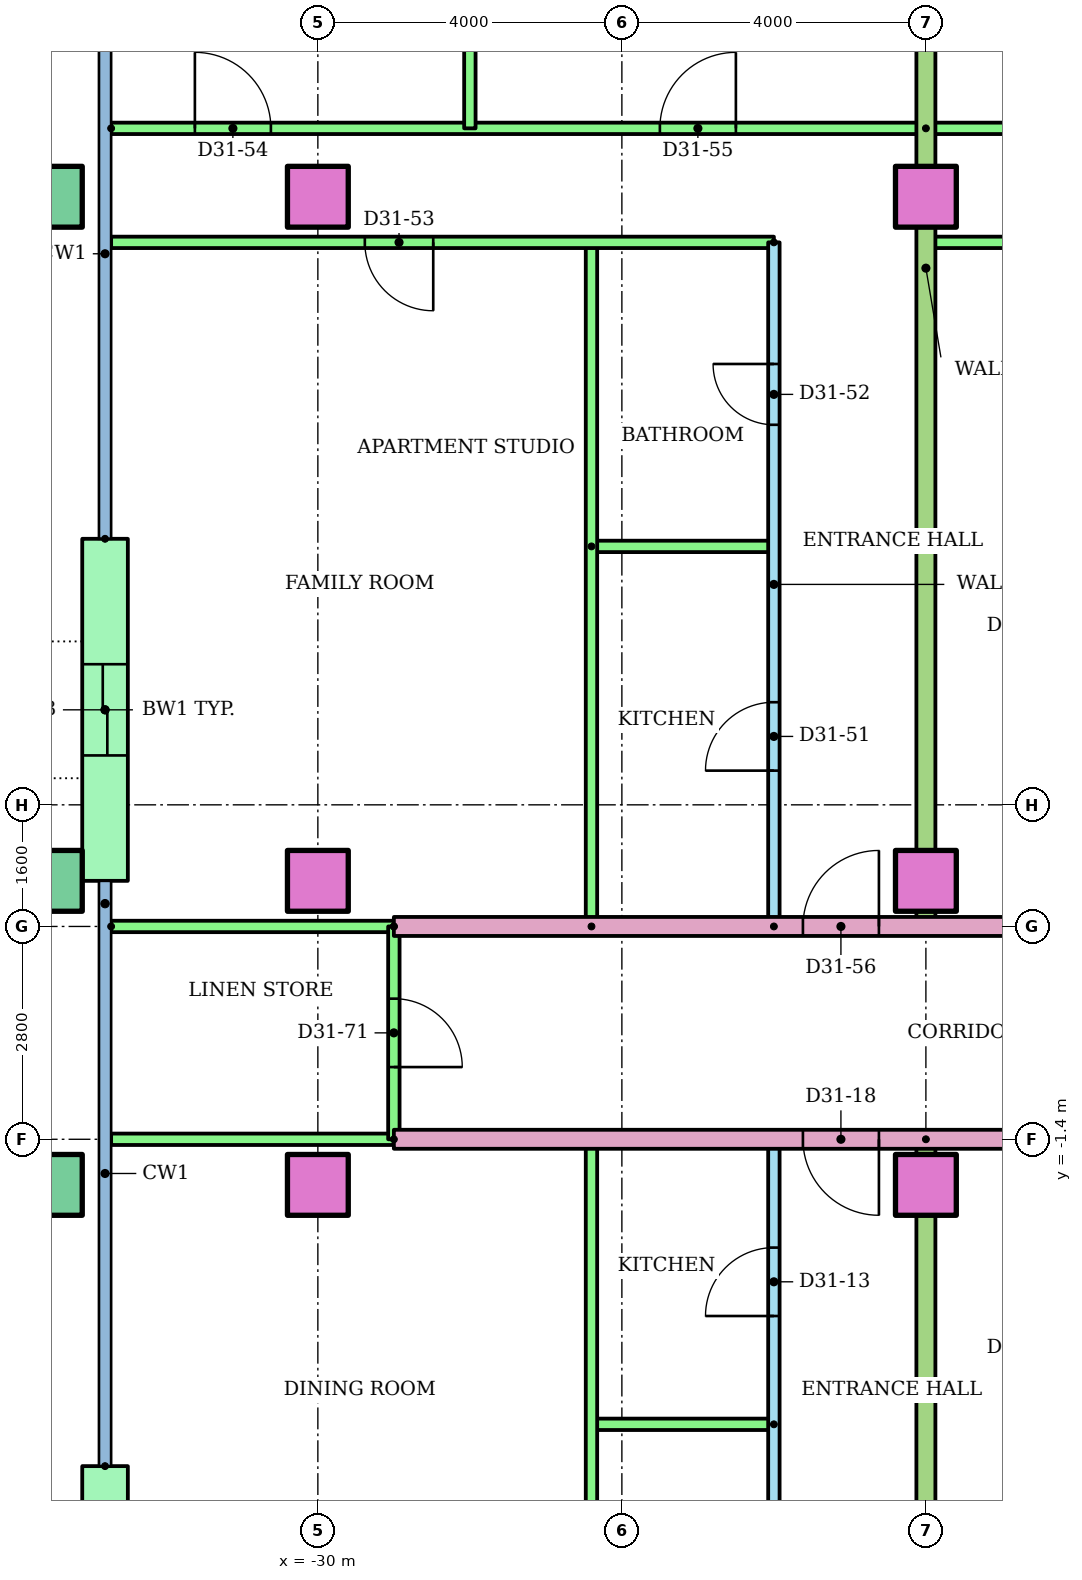
"""IFC4 building model, lengths in metres.
Left out: names, types, materials, properties, quantities, classifications, styles, units other than length and angle.
Written with IfcOpenShell. Run it as: python <this file> out.ifc"""

import sys

from ifc_helpers import new_model, si_unit, direction, frame, frame_2d, origin, origin_2d, place, context, subcontext, project, spatial, rectangle, hollow_rectangle, extrude, element, fill, save


model = new_model("IFC4")
c1 = context("Model", 3, precision=1e-05, world=origin(), true_north=direction((0.0, 1.0)))
c2 = subcontext(c1, "Body", "Model", "MODEL_VIEW")
j1 = project(units=[si_unit("LENGTHUNIT", "METRE"), si_unit("PLANEANGLEUNIT", "RADIAN")], contexts=[c1])
p1 = place(None, origin())
s1 = spatial("IfcSite", under=j1, at=p1, CompositionType="ELEMENT")
p2 = place(p1, origin())
s2 = spatial("IfcBuilding", under=s1, at=p2, CompositionType="ELEMENT")
p3 = place(p2, frame((0.0, 0.0, 123.0)))
s3 = spatial("IfcBuildingStorey", under=s2, at=p3, CompositionType="ELEMENT", Elevation=123.0)
p4 = place(p3, frame((-33.5, -2.0, 0.0)))
e1 = element("IfcColumn", 1, at=p4, inside=s3, PredefinedType="COLUMN", context=c2, shape_type="SweptSolid", body=[
    extrude(hollow_rectangle(XDim=0.8, YDim=0.8, WallThickness=0.04, at=origin_2d()), origin(), (0.0, 0.0, 1.0), 3.2),
])
for number, where in (
    (2, (-30.0, -2.0, 0.0)),
    (3, (-22.0, -2.0, 0.0)),
):
    element("IfcColumn", number, at=place(p3, frame(where)), inside=s3, PredefinedType="COLUMN", context=c2, shape_type="SweptSolid", body=[
        extrude(rectangle(XDim=0.8, YDim=0.8, at=origin_2d()), origin(), (0.0, 0.0, 1.0), 3.2),
    ])
p5 = place(p3, frame((-33.5, 2.0, 0.0)))
e4 = element("IfcColumn", 4, at=p5, inside=s3, PredefinedType="COLUMN", context=c2, shape_type="SweptSolid", body=[
    extrude(hollow_rectangle(XDim=0.8, YDim=0.8, WallThickness=0.04, at=origin_2d()), origin(), (0.0, 0.0, 1.0), 3.2),
])
for number, where in (
    (5, (-30.0, 2.0, 0.0)),
    (6, (-22.0, 2.0, 0.0)),
):
    element("IfcColumn", number, at=place(p3, frame(where)), inside=s3, PredefinedType="COLUMN", context=c2, shape_type="SweptSolid", body=[
        extrude(rectangle(XDim=0.8, YDim=0.8, at=origin_2d()), origin(), (0.0, 0.0, 1.0), 3.2),
    ])
p6 = place(p3, frame((-33.5, 11.0, 0.0)))
e7 = element("IfcColumn", 7, at=p6, inside=s3, PredefinedType="COLUMN", context=c2, shape_type="SweptSolid", body=[
    extrude(hollow_rectangle(XDim=0.8, YDim=0.8, WallThickness=0.04, at=origin_2d()), origin(), (0.0, 0.0, 1.0), 3.2),
])
for number, where in (
    (8, (-30.0, 11.0, 0.0)),
    (9, (-22.0, 11.0, 0.0)),
):
    element("IfcColumn", number, at=place(p3, frame(where)), inside=s3, PredefinedType="COLUMN", context=c2, shape_type="SweptSolid", body=[
        extrude(rectangle(XDim=0.8, YDim=0.8, at=origin_2d()), origin(), (0.0, 0.0, 1.0), 3.2),
    ])
p7 = place(p3, frame((-32.8, 6.5, 0.0), z_axis=(0.0, 0.0, 1.0), x_axis=(0.0, -1.0, 0.0)))
e10 = element("IfcWall", 10, at=p7, inside=s3, PredefinedType="STANDARD", context=c2, shape_type="SweptSolid", body=[
    extrude(rectangle(XDim=4.5, YDim=0.6, at=frame_2d((2.25, 0.0))), origin(), (0.0, 0.0, 1.0), 2.92),
])
p8 = place(p7, frame((1.65, 0.0, 0.0)))
e11 = element("IfcOpeningElement", 11, at=p8, cuts=e10, PredefinedType="OPENING", context=c2, shape_type="SweptSolid", body=[
    extrude(rectangle(XDim=1.2, YDim=2.1, at=frame_2d((0.6, 1.05))), frame((0.0, 0.31, 0.0), z_axis=(0.0, -1.0, 0.0), x_axis=(1.0, 0.0, 0.0)), (0.0, 0.0, 1.0), 0.62),
])
p9 = place(p3, frame((-32.8, -5.7, 0.0), z_axis=(0.0, 0.0, 1.0), x_axis=(0.0, -1.0, 0.0)))
e12 = element("IfcWall", 12, at=p9, inside=s3, PredefinedType="STANDARD", context=c2, shape_type="SweptSolid", body=[
    extrude(rectangle(XDim=3.7, YDim=0.6, at=frame_2d((1.85, 0.0))), origin(), (0.0, 0.0, 1.0), 2.92),
])
p10 = place(p9, frame((0.925, 0.0, 0.0)))
e13 = element("IfcOpeningElement", 13, at=p10, cuts=e12, PredefinedType="OPENING", context=c2, shape_type="SweptSolid", body=[
    extrude(rectangle(XDim=1.2, YDim=2.1, at=frame_2d((0.6, 1.05))), frame((0.0, 0.31, 0.0), z_axis=(0.0, -1.0, 0.0), x_axis=(1.0, 0.0, 0.0)), (0.0, 0.0, 1.0), 0.62),
])
p11 = place(p3, frame((-24.0, -8.0, 0.0), z_axis=(0.0, 0.0, 1.0), x_axis=(0.0, 1.0, 0.0)))
e14 = element("IfcWall", 14, at=p11, inside=s3, PredefinedType="PARTITIONING", context=c2, shape_type="SweptSolid", body=[
    extrude(rectangle(XDim=6.6, YDim=0.15, at=frame_2d((3.3, 0.0))), origin(), (0.0, 0.0, 1.0), 2.4),
])
p12 = place(p11, frame((4.275, 0.0, 0.0)))
e15 = element("IfcOpeningElement", 15, at=p12, cuts=e14, PredefinedType="OPENING", context=c2, shape_type="SweptSolid", body=[
    extrude(rectangle(XDim=0.9, YDim=2.1, at=frame_2d((0.45, 1.05))), frame((0.0, 0.085, 0.0), z_axis=(0.0, -1.0, 0.0), x_axis=(1.0, 0.0, 0.0)), (0.0, 0.0, 1.0), 0.17),
])
p13 = place(p11, frame((1.025, 0.0, 0.0)))
e16 = element("IfcOpeningElement", 16, at=p13, cuts=e14, PredefinedType="OPENING", context=c2, shape_type="SweptSolid", body=[
    extrude(rectangle(XDim=0.8, YDim=2.1, at=frame_2d((0.4, 1.05))), frame((0.0, 0.085, 0.0), z_axis=(0.0, -1.0, 0.0), x_axis=(1.0, 0.0, 0.0)), (0.0, 0.0, 1.0), 0.17),
])
p14 = place(p3, frame((-24.0, -5.15, 0.0), z_axis=(0.0, 0.0, 1.0), x_axis=(-1.0, 0.0, 0.0)))
e17 = element("IfcWall", 17, at=p14, inside=s3, PredefinedType="PARTITIONING", context=c2, shape_type="SweptSolid", body=[
    extrude(rectangle(XDim=2.4, YDim=0.15, at=frame_2d((1.2, 0.0))), origin(), (0.0, 0.0, 1.0), 2.4),
])
p15 = place(p3, frame((-26.4, -8.0, 0.0), z_axis=(0.0, 0.0, 1.0), x_axis=(0.0, 1.0, 0.0)))
e18 = element("IfcWall", 18, at=p15, inside=s3, PredefinedType="PARTITIONING", context=c2, shape_type="SweptSolid", body=[
    extrude(rectangle(XDim=6.6, YDim=0.15, at=frame_2d((3.3, 0.0))), origin(), (0.0, 0.0, 1.0), 2.4),
])
p16 = place(p3, frame((-22.0, -1.4, 0.0), z_axis=(0.0, 0.0, 1.0), x_axis=(0.0, -1.0, 0.0)))
e19 = element("IfcWall", 19, at=p16, inside=s3, PredefinedType="PARTITIONING", context=c2, shape_type="SweptSolid", body=[
    extrude(rectangle(XDim=14.91, YDim=0.25, at=frame_2d((7.455, 0.0))), origin(), (0.0, 0.0, 1.0), 2.4),
])
p17 = place(p3, frame((-14.0, -1.4, 0.0), z_axis=(0.0, 0.0, 1.0), x_axis=(-1.0, 0.0, 0.0)))
e20 = element("IfcWall", 20, at=p17, inside=s3, PredefinedType="PARTITIONING", context=c2, shape_type="SweptSolid", body=[
    extrude(rectangle(XDim=15.0, YDim=0.25, at=frame_2d((7.5, 0.0))), origin(), (0.0, 0.0, 1.0), 2.4),
])
p18 = place(p17, frame((8.618, 0.0, 0.0)))
e21 = element("IfcOpeningElement", 21, at=p18, cuts=e20, PredefinedType="OPENING", context=c2, shape_type="SweptSolid", body=[
    extrude(rectangle(XDim=1.0, YDim=2.1, at=frame_2d((0.5, 1.05))), frame((0.0, 0.135, 0.0), z_axis=(0.0, -1.0, 0.0), x_axis=(1.0, 0.0, 0.0)), (0.0, 0.0, 1.0), 0.27),
])
p19 = place(p17, frame((0.618, 0.0, 0.0)))
e22 = element("IfcOpeningElement", 22, at=p19, cuts=e20, PredefinedType="OPENING", context=c2, shape_type="SweptSolid", body=[
    extrude(rectangle(XDim=1.0, YDim=2.1, at=frame_2d((0.5, 1.05))), frame((0.0, 0.135, 0.0), z_axis=(0.0, -1.0, 0.0), x_axis=(1.0, 0.0, 0.0)), (0.0, 0.0, 1.0), 0.27),
])
p20 = place(p3, frame((-29.0, -1.4, 0.0), z_axis=(0.0, 0.0, 1.0), x_axis=(-1.0, 0.0, 0.0)))
e23 = element("IfcWall", 23, at=p20, inside=s3, PredefinedType="PARTITIONING", context=c2, shape_type="SweptSolid", body=[
    extrude(rectangle(XDim=3.72, YDim=0.15, at=frame_2d((1.86, 0.0))), origin(), (0.0, 0.0, 1.0), 2.4),
])
p21 = place(p3, frame((-24.0, 1.4, 0.0), z_axis=(0.0, 0.0, 1.0), x_axis=(0.0, 1.0, 0.0)))
e24 = element("IfcWall", 24, at=p21, inside=s3, PredefinedType="PARTITIONING", context=c2, shape_type="SweptSolid", body=[
    extrude(rectangle(XDim=9.0, YDim=0.15, at=frame_2d((4.5, 0.0))), origin(), (0.0, 0.0, 1.0), 2.4),
])
p22 = place(p21, frame((2.05, 0.0, 0.0)))
e25 = element("IfcOpeningElement", 25, at=p22, cuts=e24, PredefinedType="OPENING", context=c2, shape_type="SweptSolid", body=[
    extrude(rectangle(XDim=0.9, YDim=2.1, at=frame_2d((0.45, 1.05))), frame((0.0, 0.085, 0.0), z_axis=(0.0, -1.0, 0.0), x_axis=(1.0, 0.0, 0.0)), (0.0, 0.0, 1.0), 0.17),
])
p23 = place(p21, frame((6.6, 0.0, 0.0)))
e26 = element("IfcOpeningElement", 26, at=p23, cuts=e24, PredefinedType="OPENING", context=c2, shape_type="SweptSolid", body=[
    extrude(rectangle(XDim=0.8, YDim=2.1, at=frame_2d((0.4, 1.05))), frame((0.0, 0.085, 0.0), z_axis=(0.0, -1.0, 0.0), x_axis=(1.0, 0.0, 0.0)), (0.0, 0.0, 1.0), 0.17),
])
p24 = place(p3, frame((-26.4, 6.4, 0.0)))
e27 = element("IfcWall", 27, at=p24, inside=s3, PredefinedType="PARTITIONING", context=c2, shape_type="SweptSolid", body=[
    extrude(rectangle(XDim=2.4, YDim=0.15, at=frame_2d((1.2, 0.0))), origin(), (0.0, 0.0, 1.0), 2.4),
])
p25 = place(p3, frame((-26.4, 1.4, 0.0), z_axis=(0.0, 0.0, 1.0), x_axis=(0.0, 1.0, 0.0)))
e28 = element("IfcWall", 28, at=p25, inside=s3, PredefinedType="PARTITIONING", context=c2, shape_type="SweptSolid", body=[
    extrude(rectangle(XDim=9.0, YDim=0.15, at=frame_2d((4.5, 0.0))), origin(), (0.0, 0.0, 1.0), 2.4),
])
p26 = place(p3, frame((-24.0, 10.4, 0.0), z_axis=(0.0, 0.0, 1.0), x_axis=(-1.0, 0.0, 0.0)))
e29 = element("IfcWall", 29, at=p26, inside=s3, PredefinedType="PARTITIONING", context=c2, shape_type="SweptSolid", body=[
    extrude(rectangle(XDim=8.72, YDim=0.15, at=frame_2d((4.36, 0.0))), origin(), (0.0, 0.0, 1.0), 2.4),
])
p27 = place(p26, frame((4.482, 0.0, 0.0)))
e30 = element("IfcOpeningElement", 30, at=p27, cuts=e29, PredefinedType="OPENING", context=c2, shape_type="SweptSolid", body=[
    extrude(rectangle(XDim=0.9, YDim=2.1, at=frame_2d((0.45, 1.05))), frame((0.0, 0.085, 0.0), z_axis=(0.0, -1.0, 0.0), x_axis=(1.0, 0.0, 0.0)), (0.0, 0.0, 1.0), 0.17),
])
p28 = place(p3, frame((-32.72, 11.9, 0.0)))
e31 = element("IfcWall", 31, at=p28, inside=s3, PredefinedType="PARTITIONING", context=c2, shape_type="SweptSolid", body=[
    extrude(rectangle(XDim=10.72, YDim=0.15, at=frame_2d((5.36, 0.0))), origin(), (0.0, 0.0, 1.0), 2.4),
])
p29 = place(p28, frame((1.102, 0.0, 0.0)))
e32 = element("IfcOpeningElement", 32, at=p29, cuts=e31, PredefinedType="OPENING", context=c2, shape_type="SweptSolid", body=[
    extrude(rectangle(XDim=1.0, YDim=2.1, at=frame_2d((0.5, 1.05))), frame((0.0, 0.085, 0.0), z_axis=(0.0, -1.0, 0.0), x_axis=(1.0, 0.0, 0.0)), (0.0, 0.0, 1.0), 0.17),
])
p30 = place(p28, frame((7.22, 0.0, 0.0)))
e33 = element("IfcOpeningElement", 33, at=p30, cuts=e31, PredefinedType="OPENING", context=c2, shape_type="SweptSolid", body=[
    extrude(rectangle(XDim=1.0, YDim=2.1, at=frame_2d((0.5, 1.05))), frame((0.0, 0.085, 0.0), z_axis=(0.0, -1.0, 0.0), x_axis=(1.0, 0.0, 0.0)), (0.0, 0.0, 1.0), 0.17),
])
p31 = place(p3, frame((-28.0, 16.92, 0.0), z_axis=(0.0, 0.0, 1.0), x_axis=(0.0, -1.0, 0.0)))
e34 = element("IfcWall", 34, at=p31, inside=s3, PredefinedType="PARTITIONING", context=c2, shape_type="SweptSolid", body=[
    extrude(rectangle(XDim=5.02, YDim=0.15, at=frame_2d((2.51, 0.0))), origin(), (0.0, 0.0, 1.0), 2.4),
])
p32 = place(p3, frame((-16.0, 10.4, 0.0), z_axis=(0.0, 0.0, 1.0), x_axis=(-1.0, 0.0, 0.0)))
e35 = element("IfcWall", 35, at=p32, inside=s3, PredefinedType="PARTITIONING", context=c2, shape_type="SweptSolid", body=[
    extrude(rectangle(XDim=6.0, YDim=0.15, at=frame_2d((3.0, 0.0))), origin(), (0.0, 0.0, 1.0), 2.4),
])
p33 = place(p32, frame((3.75, 0.0, 0.0)))
e36 = element("IfcOpeningElement", 36, at=p33, cuts=e35, PredefinedType="OPENING", context=c2, shape_type="SweptSolid", body=[
    extrude(rectangle(XDim=0.9, YDim=2.1, at=frame_2d((0.45, 1.05))), frame((0.0, 0.085, 0.0), z_axis=(0.0, -1.0, 0.0), x_axis=(1.0, 0.0, 0.0)), (0.0, 0.0, 1.0), 0.17),
])
p34 = place(p3, frame((-22.0, 11.9, 0.0)))
e37 = element("IfcWall", 37, at=p34, inside=s3, PredefinedType="PARTITIONING", context=c2, shape_type="SweptSolid", body=[
    extrude(rectangle(XDim=8.0, YDim=0.15, at=frame_2d((4.0, 0.0))), origin(), (0.0, 0.0, 1.0), 2.4),
])
p35 = place(p34, frame((3.5, 0.0, 0.0)))
e38 = element("IfcOpeningElement", 38, at=p35, cuts=e37, PredefinedType="OPENING", context=c2, shape_type="SweptSolid", body=[
    extrude(rectangle(XDim=1.0, YDim=2.1, at=frame_2d((0.5, 1.05))), frame((0.0, 0.085, 0.0), z_axis=(0.0, -1.0, 0.0), x_axis=(1.0, 0.0, 0.0)), (0.0, 0.0, 1.0), 0.17),
])
p36 = place(p3, frame((-22.0, 18.721, 0.0), z_axis=(0.0, 0.0, 1.0), x_axis=(0.0, -1.0, 0.0)))
e39 = element("IfcWall", 39, at=p36, inside=s3, PredefinedType="PARTITIONING", context=c2, shape_type="SweptSolid", body=[
    extrude(rectangle(XDim=17.321, YDim=0.25, at=frame_2d((8.661, 0.0))), origin(), (0.0, 0.0, 1.0), 2.4),
])
p37 = place(p3, frame((-29.0, 1.4, 0.0)))
e40 = element("IfcWall", 40, at=p37, inside=s3, PredefinedType="PARTITIONING", context=c2, shape_type="SweptSolid", body=[
    extrude(rectangle(XDim=15.0, YDim=0.25, at=frame_2d((7.5, 0.0))), origin(), (0.0, 0.0, 1.0), 2.4),
])
p38 = place(p37, frame((5.382, 0.0, 0.0)))
e41 = element("IfcOpeningElement", 41, at=p38, cuts=e40, PredefinedType="OPENING", context=c2, shape_type="SweptSolid", body=[
    extrude(rectangle(XDim=1.0, YDim=2.1, at=frame_2d((0.5, 1.05))), frame((0.0, 0.135, 0.0), z_axis=(0.0, -1.0, 0.0), x_axis=(1.0, 0.0, 0.0)), (0.0, 0.0, 1.0), 0.27),
])
p39 = place(p37, frame((13.5, 0.0, 0.0)))
e42 = element("IfcOpeningElement", 42, at=p39, cuts=e40, PredefinedType="OPENING", context=c2, shape_type="SweptSolid", body=[
    extrude(rectangle(XDim=1.0, YDim=2.1, at=frame_2d((0.5, 1.05))), frame((0.0, 0.135, 0.0), z_axis=(0.0, -1.0, 0.0), x_axis=(1.0, 0.0, 0.0)), (0.0, 0.0, 1.0), 0.27),
])
p40 = place(p3, frame((-32.72, 1.4, 0.0)))
e43 = element("IfcWall", 43, at=p40, inside=s3, PredefinedType="PARTITIONING", context=c2, shape_type="SweptSolid", body=[
    extrude(rectangle(XDim=3.72, YDim=0.15, at=frame_2d((1.86, 0.0))), origin(), (0.0, 0.0, 1.0), 2.4),
])
p41 = place(p3, frame((-29.0, 1.4, 0.0), z_axis=(0.0, 0.0, 1.0), x_axis=(0.0, -1.0, 0.0)))
e44 = element("IfcWall", 44, at=p41, inside=s3, PredefinedType="PARTITIONING", context=c2, shape_type="SweptSolid", body=[
    extrude(rectangle(XDim=2.8, YDim=0.15, at=frame_2d((1.4, 0.0))), origin(), (0.0, 0.0, 1.0), 2.4),
])
p42 = place(p41, frame((0.95, 0.0, 0.0)))
e45 = element("IfcOpeningElement", 45, at=p42, cuts=e44, PredefinedType="OPENING", context=c2, shape_type="SweptSolid", body=[
    extrude(rectangle(XDim=0.9, YDim=2.1, at=frame_2d((0.45, 1.05))), frame((0.0, 0.085, 0.0), z_axis=(0.0, -1.0, 0.0), x_axis=(1.0, 0.0, 0.0)), (0.0, 0.0, 1.0), 0.17),
])
p43 = place(p12, origin())
e46 = element("IfcDoor", 46, at=p43, inside=s3, OperationType="SINGLE_SWING_LEFT", PredefinedType="DOOR", context=c2, shape_type="SweptSolid", body=[
    extrude(rectangle(XDim=0.9, YDim=2.1, at=frame_2d((0.45, 1.05))), frame((0.0, 0.025, 0.0), z_axis=(0.0, -1.0, 0.0), x_axis=(1.0, 0.0, 0.0)), (0.0, 0.0, 1.0), 0.05),
])
fill(e15, e46)
p44 = place(p18, origin())
e47 = element("IfcDoor", 47, at=p44, inside=s3, OperationType="SINGLE_SWING_LEFT", PredefinedType="DOOR", context=c2, shape_type="SweptSolid", body=[
    extrude(rectangle(XDim=1.0, YDim=2.1, at=frame_2d((0.5, 1.05))), frame((0.0, 0.025, 0.0), z_axis=(0.0, -1.0, 0.0), x_axis=(1.0, 0.0, 0.0)), (0.0, 0.0, 1.0), 0.05),
])
fill(e21, e47)
p45 = place(p22, origin())
e48 = element("IfcDoor", 48, at=p45, inside=s3, OperationType="SINGLE_SWING_LEFT", PredefinedType="DOOR", context=c2, shape_type="SweptSolid", body=[
    extrude(rectangle(XDim=0.9, YDim=2.1, at=frame_2d((0.45, 1.05))), frame((0.0, 0.025, 0.0), z_axis=(0.0, -1.0, 0.0), x_axis=(1.0, 0.0, 0.0)), (0.0, 0.0, 1.0), 0.05),
])
fill(e25, e48)
p46 = place(p23, origin())
e49 = element("IfcDoor", 49, at=p46, inside=s3, OperationType="SINGLE_SWING_RIGHT", PredefinedType="DOOR", context=c2, shape_type="SweptSolid", body=[
    extrude(rectangle(XDim=0.8, YDim=2.1, at=frame_2d((0.4, 1.05))), frame((0.0, 0.025, 0.0), z_axis=(0.0, -1.0, 0.0), x_axis=(1.0, 0.0, 0.0)), (0.0, 0.0, 1.0), 0.05),
])
fill(e26, e49)
p47 = place(p27, origin())
e50 = element("IfcDoor", 50, at=p47, inside=s3, OperationType="SINGLE_SWING_LEFT", PredefinedType="DOOR", context=c2, shape_type="SweptSolid", body=[
    extrude(rectangle(XDim=0.9, YDim=2.1, at=frame_2d((0.45, 1.05))), frame((0.0, 0.025, 0.0), z_axis=(0.0, -1.0, 0.0), x_axis=(1.0, 0.0, 0.0)), (0.0, 0.0, 1.0), 0.05),
])
fill(e30, e50)
p48 = place(p29, origin())
e51 = element("IfcDoor", 51, at=p48, inside=s3, OperationType="SINGLE_SWING_LEFT", PredefinedType="DOOR", context=c2, shape_type="SweptSolid", body=[
    extrude(rectangle(XDim=1.0, YDim=2.1, at=frame_2d((0.5, 1.05))), frame((0.0, 0.025, 0.0), z_axis=(0.0, -1.0, 0.0), x_axis=(1.0, 0.0, 0.0)), (0.0, 0.0, 1.0), 0.05),
])
fill(e32, e51)
p49 = place(p30, origin())
e52 = element("IfcDoor", 52, at=p49, inside=s3, OperationType="SINGLE_SWING_RIGHT", PredefinedType="DOOR", context=c2, shape_type="SweptSolid", body=[
    extrude(rectangle(XDim=1.0, YDim=2.1, at=frame_2d((0.5, 1.05))), frame((0.0, 0.025, 0.0), z_axis=(0.0, -1.0, 0.0), x_axis=(1.0, 0.0, 0.0)), (0.0, 0.0, 1.0), 0.05),
])
fill(e33, e52)
p50 = place(p38, origin())
e53 = element("IfcDoor", 53, at=p50, inside=s3, OperationType="SINGLE_SWING_RIGHT", PredefinedType="DOOR", context=c2, shape_type="SweptSolid", body=[
    extrude(rectangle(XDim=1.0, YDim=2.1, at=frame_2d((0.5, 1.05))), frame((0.0, 0.025, 0.0), z_axis=(0.0, -1.0, 0.0), x_axis=(1.0, 0.0, 0.0)), (0.0, 0.0, 1.0), 0.05),
])
fill(e41, e53)
p51 = place(p42, origin())
e54 = element("IfcDoor", 54, at=p51, inside=s3, OperationType="SINGLE_SWING_RIGHT", PredefinedType="DOOR", context=c2, shape_type="SweptSolid", body=[
    extrude(rectangle(XDim=0.9, YDim=2.1, at=frame_2d((0.45, 1.05))), frame((0.0, 0.025, 0.0), z_axis=(0.0, -1.0, 0.0), x_axis=(1.0, 0.0, 0.0)), (0.0, 0.0, 1.0), 0.05),
])
fill(e45, e54)
p52 = place(p8, origin())
e55 = element("IfcDoor", 55, at=p52, inside=s3, OperationType="SLIDING_TO_LEFT", PredefinedType="DOOR", context=c2, shape_type="SweptSolid", body=[
    extrude(rectangle(XDim=1.2, YDim=2.1, at=frame_2d((0.6, 1.05))), frame((0.0, 0.025, 0.0), z_axis=(0.0, -1.0, 0.0), x_axis=(1.0, 0.0, 0.0)), (0.0, 0.0, 1.0), 0.05),
])
fill(e11, e55)
save(model, sys.argv[1])
